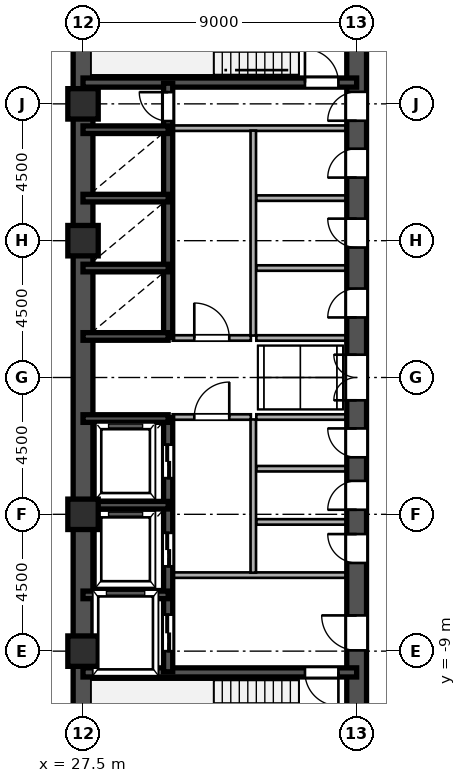
"""IFC4 building model, lengths in metres.
Left out: names, types, materials, properties, quantities, classifications, styles, units other than length and angle.
Written with IfcOpenShell. Run it as: python <this file> out.ifc"""

import sys

from ifc_helpers import new_model, si_unit, direction, frame, frame_2d, origin, origin_2d, place, context, subcontext, project, spatial, rectangle, hollow_rectangle, extrude, source, transform, mapped, element, fill, save


model = new_model("IFC4")
c1 = context("Model", 3, precision=1e-05, world=origin(), true_north=direction((0.0, 1.0)))
c2 = subcontext(c1, "Body", "Model", "MODEL_VIEW")
j1 = project(units=[si_unit("LENGTHUNIT", "METRE"), si_unit("PLANEANGLEUNIT", "RADIAN")], contexts=[c1])
p1 = place(None, origin())
s1 = spatial("IfcSite", under=j1, at=p1, CompositionType="ELEMENT")
p2 = place(p1, origin())
s2 = spatial("IfcBuilding", under=s1, at=p2, CompositionType="ELEMENT")
p3 = place(p2, frame((0.0, 0.0, 103.2)))
s3 = spatial("IfcBuildingStorey", under=s2, at=p3, CompositionType="ELEMENT", Elevation=103.2)
m1 = source(origin(), c2, "Body", "SweptSolid", [
    extrude(hollow_rectangle(XDim=1.0, YDim=1.0, WallThickness=0.042, at=origin_2d()), origin(), (0.0, 0.0, 1.0), 3.6),
])
for number, where, z_axis, x_axis in (
    (1, (27.5, -9.0, 0.0), (0.0, 0.0, 1.0), (1.0, 0.0, 0.0)),
    (2, (27.5, -4.5, 0.0), (0.0, 0.0, 1.0), (1.0, 0.0, 0.0)),
    (3, (27.5, 4.5, 0.0), (0.0, 0.0, 1.0), (1.0, 0.0, 0.0)),
    (4, (27.5, 9.0, 0.0), (0.0, 0.0, 1.0), (1.0, 0.0, 0.0)),
):
    element("IfcColumn", number, at=place(p3, frame(where, z_axis=z_axis, x_axis=x_axis)), inside=s3, PredefinedType="COLUMN", context=c2, shape_type="MappedRepresentation", body=[
        mapped(m1, transform((0.0, 0.0, 0.0), scale=1.0)),
    ])
for number, where, z_axis, x_axis in (
    (5, (27.5, -13.5, 0.0), (0.0, 0.0, 1.0), (0.0, 1.0, 0.0)),
    (6, (27.5, 1.3, 0.0), (0.0, 0.0, 1.0), (0.0, 1.0, 0.0)),
):
    element("IfcWall", number, at=place(p3, frame(where, z_axis=z_axis, x_axis=x_axis)), inside=s3, PredefinedType="SHEAR", context=c2, shape_type="SweptSolid", body=[
        extrude(rectangle(XDim=12.2, YDim=0.65, at=frame_2d((6.1, 0.0))), origin(), (0.0, 0.0, 1.0), 3.38),
    ])
p4 = place(p3, frame((27.5, -1.3, 0.0), z_axis=(0.0, 0.0, 1.0), x_axis=(0.0, 1.0, 0.0)))
e7 = element("IfcWall", 7, at=p4, inside=s3, PredefinedType="SHEAR", context=c2, shape_type="SweptSolid", body=[
    extrude(rectangle(XDim=2.6, YDim=0.65, at=frame_2d((1.3, 0.0))), origin(), (0.0, 0.0, 1.0), 3.38),
])
p5 = place(p3, frame((36.5, -13.65, 0.0), z_axis=(0.0, 0.0, 1.0), x_axis=(0.0, 1.0, 0.0)))
e8 = element("IfcWall", 8, at=p5, inside=s3, PredefinedType="SHEAR", context=c2, shape_type="SweptSolid", body=[
    extrude(rectangle(XDim=7.15, YDim=0.65, at=frame_2d((3.575, 0.0))), origin(), (0.0, 0.0, 1.0), 3.38),
])
p6 = place(p5, frame((4.675, 0.0, 0.0)))
e9 = element("IfcOpeningElement", 9, at=p6, cuts=e8, PredefinedType="OPENING", context=c2, shape_type="SweptSolid", body=[
    extrude(rectangle(XDim=1.15, YDim=2.2, at=frame_2d((0.575, 1.1))), frame((0.0, 0.335, 0.0), z_axis=(0.0, -1.0, 0.0), x_axis=(1.0, 0.0, 0.0)), (0.0, 0.0, 1.0), 0.67),
])
p7 = place(p3, frame((36.5, -1.3, 0.0), z_axis=(0.0, 0.0, 1.0), x_axis=(0.0, 1.0, 0.0)))
e10 = element("IfcWall", 10, at=p7, inside=s3, PredefinedType="SHEAR", context=c2, shape_type="SweptSolid", body=[
    extrude(rectangle(XDim=2.6, YDim=0.65, at=frame_2d((1.3, 0.0))), origin(), (0.0, 0.0, 1.0), 3.38),
])
p8 = place(p7, frame((0.55, 0.0, 0.0)))
e11 = element("IfcOpeningElement", 11, at=p8, cuts=e10, PredefinedType="OPENING", context=c2, shape_type="SweptSolid", body=[
    extrude(rectangle(XDim=1.5, YDim=2.3, at=frame_2d((0.75, 1.15))), frame((0.0, 0.335, 0.0), z_axis=(0.0, -1.0, 0.0), x_axis=(1.0, 0.0, 0.0)), (0.0, 0.0, 1.0), 0.67),
])
p9 = place(p3, frame((36.5, 8.2, 0.0), z_axis=(0.0, 0.0, 1.0), x_axis=(0.0, 1.0, 0.0)))
e12 = element("IfcWall", 12, at=p9, inside=s3, PredefinedType="SHEAR", context=c2, shape_type="SweptSolid", body=[
    extrude(rectangle(XDim=5.45, YDim=0.65, at=frame_2d((2.725, 0.0))), origin(), (0.0, 0.0, 1.0), 3.38),
])
p10 = place(p9, frame((0.245, 0.0, 0.0)))
e13 = element("IfcOpeningElement", 13, at=p10, cuts=e12, PredefinedType="OPENING", context=c2, shape_type="SweptSolid", body=[
    extrude(rectangle(XDim=0.95, YDim=2.15, at=frame_2d((0.475, 1.075))), frame((0.0, 0.335, 0.0), z_axis=(0.0, -1.0, 0.0), x_axis=(1.0, 0.0, 0.0)), (0.0, 0.0, 1.0), 0.67),
])
p11 = place(p3, frame((36.5, -6.5, 0.0), z_axis=(0.0, 0.0, 1.0), x_axis=(0.0, 1.0, 0.0)))
e14 = element("IfcWall", 14, at=p11, inside=s3, PredefinedType="SHEAR", context=c2, shape_type="SweptSolid", body=[
    extrude(rectangle(XDim=1.75, YDim=0.65, at=frame_2d((0.875, 0.0))), origin(), (0.0, 0.0, 1.0), 3.38),
])
p12 = place(p11, frame((0.4, 0.0, 0.0)))
e15 = element("IfcOpeningElement", 15, at=p12, cuts=e14, PredefinedType="OPENING", context=c2, shape_type="SweptSolid", body=[
    extrude(rectangle(XDim=0.95, YDim=2.15, at=frame_2d((0.475, 1.075))), frame((0.0, 0.335, 0.0), z_axis=(0.0, -1.0, 0.0), x_axis=(1.0, 0.0, 0.0)), (0.0, 0.0, 1.0), 0.67),
])
p13 = place(p3, frame((36.5, -4.75, 0.0), z_axis=(0.0, 0.0, 1.0), x_axis=(0.0, 1.0, 0.0)))
e16 = element("IfcWall", 16, at=p13, inside=s3, PredefinedType="SHEAR", context=c2, shape_type="SweptSolid", body=[
    extrude(rectangle(XDim=1.75, YDim=0.65, at=frame_2d((0.875, 0.0))), origin(), (0.0, 0.0, 1.0), 3.38),
])
p14 = place(p13, frame((0.4, 0.0, 0.0)))
e17 = element("IfcOpeningElement", 17, at=p14, cuts=e16, PredefinedType="OPENING", context=c2, shape_type="SweptSolid", body=[
    extrude(rectangle(XDim=0.95, YDim=2.15, at=frame_2d((0.475, 1.075))), frame((0.0, 0.335, 0.0), z_axis=(0.0, -1.0, 0.0), x_axis=(1.0, 0.0, 0.0)), (0.0, 0.0, 1.0), 0.67),
])
p15 = place(p3, frame((36.5, -3.0, 0.0), z_axis=(0.0, 0.0, 1.0), x_axis=(0.0, 1.0, 0.0)))
e18 = element("IfcWall", 18, at=p15, inside=s3, PredefinedType="SHEAR", context=c2, shape_type="SweptSolid", body=[
    extrude(rectangle(XDim=1.7, YDim=0.65, at=frame_2d((0.85, 0.0))), origin(), (0.0, 0.0, 1.0), 3.38),
])
p16 = place(p15, frame((0.375, 0.0, 0.0)))
e19 = element("IfcOpeningElement", 19, at=p16, cuts=e18, PredefinedType="OPENING", context=c2, shape_type="SweptSolid", body=[
    extrude(rectangle(XDim=0.95, YDim=2.15, at=frame_2d((0.475, 1.075))), frame((0.0, 0.335, 0.0), z_axis=(0.0, -1.0, 0.0), x_axis=(1.0, 0.0, 0.0)), (0.0, 0.0, 1.0), 0.67),
])
p17 = place(p3, frame((36.5, 1.3, 0.0), z_axis=(0.0, 0.0, 1.0), x_axis=(0.0, 1.0, 0.0)))
e20 = element("IfcWall", 20, at=p17, inside=s3, PredefinedType="SHEAR", context=c2, shape_type="SweptSolid", body=[
    extrude(rectangle(XDim=2.3, YDim=0.65, at=frame_2d((1.15, 0.0))), origin(), (0.0, 0.0, 1.0), 3.38),
])
p18 = place(p17, frame((0.675, 0.0, 0.0)))
e21 = element("IfcOpeningElement", 21, at=p18, cuts=e20, PredefinedType="OPENING", context=c2, shape_type="SweptSolid", body=[
    extrude(rectangle(XDim=0.95, YDim=2.15, at=frame_2d((0.475, 1.075))), frame((0.0, 0.335, 0.0), z_axis=(0.0, -1.0, 0.0), x_axis=(1.0, 0.0, 0.0)), (0.0, 0.0, 1.0), 0.67),
])
p19 = place(p3, frame((36.5, 3.6, 0.0), z_axis=(0.0, 0.0, 1.0), x_axis=(0.0, 1.0, 0.0)))
e22 = element("IfcWall", 22, at=p19, inside=s3, PredefinedType="SHEAR", context=c2, shape_type="SweptSolid", body=[
    extrude(rectangle(XDim=2.3, YDim=0.65, at=frame_2d((1.15, 0.0))), origin(), (0.0, 0.0, 1.0), 3.38),
])
p20 = place(p19, frame((0.675, 0.0, 0.0)))
e23 = element("IfcOpeningElement", 23, at=p20, cuts=e22, PredefinedType="OPENING", context=c2, shape_type="SweptSolid", body=[
    extrude(rectangle(XDim=0.95, YDim=2.15, at=frame_2d((0.475, 1.075))), frame((0.0, 0.335, 0.0), z_axis=(0.0, -1.0, 0.0), x_axis=(1.0, 0.0, 0.0)), (0.0, 0.0, 1.0), 0.67),
])
p21 = place(p3, frame((36.5, 5.9, 0.0), z_axis=(0.0, 0.0, 1.0), x_axis=(0.0, 1.0, 0.0)))
e24 = element("IfcWall", 24, at=p21, inside=s3, PredefinedType="SHEAR", context=c2, shape_type="SweptSolid", body=[
    extrude(rectangle(XDim=2.3, YDim=0.65, at=frame_2d((1.15, 0.0))), origin(), (0.0, 0.0, 1.0), 3.38),
])
p22 = place(p21, frame((0.675, 0.0, 0.0)))
e25 = element("IfcOpeningElement", 25, at=p22, cuts=e24, PredefinedType="OPENING", context=c2, shape_type="SweptSolid", body=[
    extrude(rectangle(XDim=0.95, YDim=2.15, at=frame_2d((0.475, 1.075))), frame((0.0, 0.335, 0.0), z_axis=(0.0, -1.0, 0.0), x_axis=(1.0, 0.0, 0.0)), (0.0, 0.0, 1.0), 0.67),
])
p23 = place(p3, frame((27.5, -9.7, 0.0), z_axis=(0.0, 0.0, 1.0), x_axis=(1.0, 0.0, 0.0)))
e26 = element("IfcWall", 26, at=p23, inside=s3, PredefinedType="SHEAR", context=c2, shape_type="SweptSolid", body=[
    extrude(rectangle(XDim=9.0, YDim=0.3, at=frame_2d((4.5, 0.0))), origin(), (0.0, 0.0, 1.0), 3.38),
])
p24 = place(p23, frame((7.3, 0.0, 0.0)))
e27 = element("IfcOpeningElement", 27, at=p24, cuts=e26, PredefinedType="OPENING", context=c2, shape_type="SweptSolid", body=[
    extrude(rectangle(XDim=1.1, YDim=2.2, at=frame_2d((0.55, 1.1))), frame((0.0, 0.16, 0.0), z_axis=(0.0, -1.0, 0.0), x_axis=(1.0, 0.0, 0.0)), (0.0, 0.0, 1.0), 0.32),
])
p25 = place(p3, frame((27.5, 9.7, 0.0), z_axis=(0.0, 0.0, 1.0), x_axis=(1.0, 0.0, 0.0)))
e28 = element("IfcWall", 28, at=p25, inside=s3, PredefinedType="SHEAR", context=c2, shape_type="SweptSolid", body=[
    extrude(rectangle(XDim=9.0, YDim=0.3, at=frame_2d((4.5, 0.0))), origin(), (0.0, 0.0, 1.0), 3.38),
])
p26 = place(p25, frame((7.3, 0.0, 0.0)))
e29 = element("IfcOpeningElement", 29, at=p26, cuts=e28, PredefinedType="OPENING", context=c2, shape_type="SweptSolid", body=[
    extrude(rectangle(XDim=1.1, YDim=2.2, at=frame_2d((0.55, 1.1))), frame((0.0, 0.16, 0.0), z_axis=(0.0, -1.0, 0.0), x_axis=(1.0, 0.0, 0.0)), (0.0, 0.0, 1.0), 0.32),
])
for number, where, z_axis, x_axis in (
    (30, (27.5, -7.15, 0.0), (0.0, 0.0, 1.0), (1.0, 0.0, 0.0)),
    (31, (27.5, -4.2, 0.0), (0.0, 0.0, 1.0), (1.0, 0.0, 0.0)),
    (32, (27.5, -1.35, 0.0), (0.0, 0.0, 1.0), (1.0, 0.0, 0.0)),
    (33, (27.5, 1.35, 0.0), (0.0, 0.0, 1.0), (1.0, 0.0, 0.0)),
    (34, (27.5, 3.6, 0.0), (0.0, 0.0, 1.0), (1.0, 0.0, 0.0)),
    (35, (27.5, 5.9, 0.0), (0.0, 0.0, 1.0), (1.0, 0.0, 0.0)),
    (36, (27.5, 8.15, 0.0), (0.0, 0.0, 1.0), (1.0, 0.0, 0.0)),
):
    element("IfcWall", number, at=place(p3, frame(where, z_axis=z_axis, x_axis=x_axis)), inside=s3, PredefinedType="SHEAR", context=c2, shape_type="SweptSolid", body=[
        extrude(rectangle(XDim=2.8, YDim=0.25, at=frame_2d((1.4, 0.0))), origin(), (0.0, 0.0, 1.0), 3.38),
    ])
p27 = place(p3, frame((30.3, -9.68, 0.0), z_axis=(0.0, 0.0, 1.0), x_axis=(0.0, 1.0, 0.0)))
e37 = element("IfcWall", 37, at=p27, inside=s3, PredefinedType="SHEAR", context=c2, shape_type="SweptSolid", body=[
    extrude(rectangle(XDim=2.56, YDim=0.3, at=frame_2d((1.28, 0.0))), origin(), (0.0, 0.0, 1.0), 3.38),
])
p28 = place(p27, frame((0.68, 0.0, 0.0)))
e38 = element("IfcOpeningElement", 38, at=p28, cuts=e37, PredefinedType="OPENING", context=c2, shape_type="SweptSolid", body=[
    extrude(rectangle(XDim=1.2, YDim=2.25, at=frame_2d((0.6, 1.125))), frame((0.0, 0.16, 0.0), z_axis=(0.0, -1.0, 0.0), x_axis=(1.0, 0.0, 0.0)), (0.0, 0.0, 1.0), 0.32),
])
p29 = place(p3, frame((30.3, -7.12, 0.0), z_axis=(0.0, 0.0, 1.0), x_axis=(0.0, 1.0, 0.0)))
e39 = element("IfcWall", 39, at=p29, inside=s3, PredefinedType="SHEAR", context=c2, shape_type="SweptSolid", body=[
    extrude(rectangle(XDim=2.92, YDim=0.3, at=frame_2d((1.46, 0.0))), origin(), (0.0, 0.0, 1.0), 3.38),
])
p30 = place(p29, frame((0.91, 0.0, 0.0)))
e40 = element("IfcOpeningElement", 40, at=p30, cuts=e39, PredefinedType="OPENING", context=c2, shape_type="SweptSolid", body=[
    extrude(rectangle(XDim=1.1, YDim=2.2, at=frame_2d((0.55, 1.1))), frame((0.0, 0.16, 0.0), z_axis=(0.0, -1.0, 0.0), x_axis=(1.0, 0.0, 0.0)), (0.0, 0.0, 1.0), 0.32),
])
p31 = place(p3, frame((30.3, -4.2, 0.0), z_axis=(0.0, 0.0, 1.0), x_axis=(0.0, 1.0, 0.0)))
e41 = element("IfcWall", 41, at=p31, inside=s3, PredefinedType="SHEAR", context=c2, shape_type="SweptSolid", body=[
    extrude(rectangle(XDim=2.88, YDim=0.3, at=frame_2d((1.44, 0.0))), origin(), (0.0, 0.0, 1.0), 3.38),
])
p32 = place(p31, frame((0.89, 0.0, 0.0)))
e42 = element("IfcOpeningElement", 42, at=p32, cuts=e41, PredefinedType="OPENING", context=c2, shape_type="SweptSolid", body=[
    extrude(rectangle(XDim=1.1, YDim=2.2, at=frame_2d((0.55, 1.1))), frame((0.0, 0.16, 0.0), z_axis=(0.0, -1.0, 0.0), x_axis=(1.0, 0.0, 0.0)), (0.0, 0.0, 1.0), 0.32),
])
p33 = place(p3, frame((30.3, 1.32, 0.0), z_axis=(0.0, 0.0, 1.0), x_axis=(0.0, 1.0, 0.0)))
e43 = element("IfcWall", 43, at=p33, inside=s3, PredefinedType="SHEAR", context=c2, shape_type="SweptSolid", body=[
    extrude(rectangle(XDim=2.28, YDim=0.3, at=frame_2d((1.14, 0.0))), origin(), (0.0, 0.0, 1.0), 3.38),
])
p34 = place(p3, frame((30.3, 3.6, 0.0), z_axis=(0.0, 0.0, 1.0), x_axis=(0.0, 1.0, 0.0)))
e44 = element("IfcWall", 44, at=p34, inside=s3, PredefinedType="SHEAR", context=c2, shape_type="SweptSolid", body=[
    extrude(rectangle(XDim=2.3, YDim=0.3, at=frame_2d((1.15, 0.0))), origin(), (0.0, 0.0, 1.0), 3.38),
])
p35 = place(p3, frame((30.3, 5.9, 0.0), z_axis=(0.0, 0.0, 1.0), x_axis=(0.0, 1.0, 0.0)))
e45 = element("IfcWall", 45, at=p35, inside=s3, PredefinedType="SHEAR", context=c2, shape_type="SweptSolid", body=[
    extrude(rectangle(XDim=2.25, YDim=0.3, at=frame_2d((1.125, 0.0))), origin(), (0.0, 0.0, 1.0), 3.38),
])
p36 = place(p3, frame((30.3, 8.15, 0.0), z_axis=(0.0, 0.0, 1.0), x_axis=(0.0, 1.0, 0.0)))
e46 = element("IfcWall", 46, at=p36, inside=s3, PredefinedType="SHEAR", context=c2, shape_type="SweptSolid", body=[
    extrude(rectangle(XDim=1.53, YDim=0.3, at=frame_2d((0.765, 0.0))), origin(), (0.0, 0.0, 1.0), 3.38),
])
p37 = place(p36, frame((0.285, 0.0, 0.0)))
e47 = element("IfcOpeningElement", 47, at=p37, cuts=e46, PredefinedType="OPENING", context=c2, shape_type="SweptSolid", body=[
    extrude(rectangle(XDim=0.95, YDim=2.15, at=frame_2d((0.475, 1.075))), frame((0.0, 0.16, 0.0), z_axis=(0.0, -1.0, 0.0), x_axis=(1.0, 0.0, 0.0)), (0.0, 0.0, 1.0), 0.32),
])
for number, where, z_axis, x_axis in (
    (48, (30.45, -6.5, 0.0), (0.0, 0.0, 1.0), (1.0, 0.0, 0.0)),
    (49, (30.45, 8.2, 0.0), (0.0, 0.0, 1.0), (1.0, 0.0, 0.0)),
):
    element("IfcWall", number, at=place(p3, frame(where, z_axis=z_axis, x_axis=x_axis)), inside=s3, PredefinedType="PARTITIONING", context=c2, shape_type="SweptSolid", body=[
        extrude(rectangle(XDim=5.7, YDim=0.18, at=frame_2d((2.85, 0.0))), origin(), (0.0, 0.0, 1.0), 3.38),
    ])
p38 = place(p3, frame((33.1, -6.42, 0.0), z_axis=(0.0, 0.0, 1.0), x_axis=(0.0, 1.0, 0.0)))
e50 = element("IfcWall", 50, at=p38, inside=s3, PredefinedType="PARTITIONING", context=c2, shape_type="SweptSolid", body=[
    extrude(rectangle(XDim=5.04, YDim=0.18, at=frame_2d((2.52, 0.0))), origin(), (0.0, 0.0, 1.0), 3.38),
])
p39 = place(p3, frame((33.1, 1.38, 0.0), z_axis=(0.0, 0.0, 1.0), x_axis=(0.0, 1.0, 0.0)))
e51 = element("IfcWall", 51, at=p39, inside=s3, PredefinedType="PARTITIONING", context=c2, shape_type="SweptSolid", body=[
    extrude(rectangle(XDim=6.74, YDim=0.18, at=frame_2d((3.37, 0.0))), origin(), (0.0, 0.0, 1.0), 3.38),
])
p40 = place(p3, frame((30.45, -1.3, 0.0), z_axis=(0.0, 0.0, 1.0), x_axis=(1.0, 0.0, 0.0)))
e52 = element("IfcWall", 52, at=p40, inside=s3, PredefinedType="PARTITIONING", context=c2, shape_type="SweptSolid", body=[
    extrude(rectangle(XDim=2.57, YDim=0.18, at=frame_2d((1.285, 0.0))), origin(), (0.0, 0.0, 1.0), 3.38),
])
p41 = place(p40, frame((0.71, 0.0, 0.0)))
e53 = element("IfcOpeningElement", 53, at=p41, cuts=e52, PredefinedType="OPENING", context=c2, shape_type="SweptSolid", body=[
    extrude(rectangle(XDim=1.15, YDim=2.2, at=frame_2d((0.575, 1.1))), frame((0.0, 0.1, 0.0), z_axis=(0.0, -1.0, 0.0), x_axis=(1.0, 0.0, 0.0)), (0.0, 0.0, 1.0), 0.2),
])
p42 = place(p3, frame((30.45, 1.3, 0.0), z_axis=(0.0, 0.0, 1.0), x_axis=(1.0, 0.0, 0.0)))
e54 = element("IfcWall", 54, at=p42, inside=s3, PredefinedType="PARTITIONING", context=c2, shape_type="SweptSolid", body=[
    extrude(rectangle(XDim=2.57, YDim=0.18, at=frame_2d((1.285, 0.0))), origin(), (0.0, 0.0, 1.0), 3.38),
])
p43 = place(p42, frame((0.71, 0.0, 0.0)))
e55 = element("IfcOpeningElement", 55, at=p43, cuts=e54, PredefinedType="OPENING", context=c2, shape_type="SweptSolid", body=[
    extrude(rectangle(XDim=1.15, YDim=2.2, at=frame_2d((0.575, 1.1))), frame((0.0, 0.1, 0.0), z_axis=(0.0, -1.0, 0.0), x_axis=(1.0, 0.0, 0.0)), (0.0, 0.0, 1.0), 0.2),
])
for number, where, z_axis, x_axis in (
    (56, (33.2, -1.3, 0.0), (0.0, 0.0, 1.0), (1.0, 0.0, 0.0)),
    (57, (33.2, 1.3, 0.0), (0.0, 0.0, 1.0), (1.0, 0.0, 0.0)),
    (58, (33.2, -4.75, 0.0), (0.0, 0.0, 1.0), (1.0, 0.0, 0.0)),
    (59, (33.2, -3.0, 0.0), (0.0, 0.0, 1.0), (1.0, 0.0, 0.0)),
    (60, (33.2, 3.6, 0.0), (0.0, 0.0, 1.0), (1.0, 0.0, 0.0)),
    (61, (33.2, 5.9, 0.0), (0.0, 0.0, 1.0), (1.0, 0.0, 0.0)),
):
    element("IfcWall", number, at=place(p3, frame(where, z_axis=z_axis, x_axis=x_axis)), inside=s3, PredefinedType="PARTITIONING", context=c2, shape_type="SweptSolid", body=[
        extrude(rectangle(XDim=2.95, YDim=0.18, at=frame_2d((1.475, 0.0))), origin(), (0.0, 0.0, 1.0), 3.38),
    ])
m2 = source(origin(), c2, "Body", "SweptSolid", [
    extrude(rectangle(XDim=1.15, YDim=2.2, at=frame_2d((0.575, 1.1))), frame((0.0, 0.025, 0.0), z_axis=(0.0, -1.0, 0.0), x_axis=(1.0, 0.0, 0.0)), (0.0, 0.0, 1.0), 0.05),
])
p44 = place(p6, origin())
e62 = element("IfcDoor", 62, at=p44, inside=s3, OperationType="SINGLE_SWING_RIGHT", PredefinedType="DOOR", context=c2, shape_type="MappedRepresentation", body=[
    mapped(m2, transform((0.0, 0.0, 0.0), scale=1.0)),
])
fill(e9, e62)
m3 = source(origin(), c2, "Body", "SweptSolid", [
    extrude(rectangle(XDim=1.5, YDim=2.3, at=frame_2d((0.75, 1.15))), frame((0.0, 0.025, 0.0), z_axis=(0.0, -1.0, 0.0), x_axis=(1.0, 0.0, 0.0)), (0.0, 0.0, 1.0), 0.05),
])
p45 = place(p8, origin())
e63 = element("IfcDoor", 63, at=p45, inside=s3, OperationType="DOUBLE_SWING_LEFT", PredefinedType="DOOR", context=c2, shape_type="MappedRepresentation", body=[
    mapped(m3, transform((0.0, 0.0, 0.0), scale=1.0)),
])
fill(e11, e63)
m4 = source(origin(), c2, "Body", "SweptSolid", [
    extrude(rectangle(XDim=0.95, YDim=2.15, at=frame_2d((0.475, 1.075))), frame((0.0, 0.025, 0.0), z_axis=(0.0, -1.0, 0.0), x_axis=(1.0, 0.0, 0.0)), (0.0, 0.0, 1.0), 0.05),
])
p46 = place(p10, origin())
e64 = element("IfcDoor", 64, at=p46, inside=s3, OperationType="SINGLE_SWING_LEFT", PredefinedType="DOOR", context=c2, shape_type="MappedRepresentation", body=[
    mapped(m4, transform((0.0, 0.0, 0.0), scale=1.0)),
])
fill(e13, e64)
p47 = place(p12, origin())
e65 = element("IfcDoor", 65, at=p47, inside=s3, OperationType="SINGLE_SWING_RIGHT", PredefinedType="DOOR", context=c2, shape_type="MappedRepresentation", body=[
    mapped(m4, transform((0.0, 0.0, 0.0), scale=1.0)),
])
fill(e15, e65)
p48 = place(p14, origin())
e66 = element("IfcDoor", 66, at=p48, inside=s3, OperationType="SINGLE_SWING_LEFT", PredefinedType="DOOR", context=c2, shape_type="MappedRepresentation", body=[
    mapped(m4, transform((0.0, 0.0, 0.0), scale=1.0)),
])
fill(e17, e66)
p49 = place(p16, origin())
e67 = element("IfcDoor", 67, at=p49, inside=s3, OperationType="SINGLE_SWING_RIGHT", PredefinedType="DOOR", context=c2, shape_type="MappedRepresentation", body=[
    mapped(m4, transform((0.0, 0.0, 0.0), scale=1.0)),
])
fill(e19, e67)
p50 = place(p18, origin())
e68 = element("IfcDoor", 68, at=p50, inside=s3, OperationType="SINGLE_SWING_LEFT", PredefinedType="DOOR", context=c2, shape_type="MappedRepresentation", body=[
    mapped(m4, transform((0.0, 0.0, 0.0), scale=1.0)),
])
fill(e21, e68)
p51 = place(p20, origin())
e69 = element("IfcDoor", 69, at=p51, inside=s3, OperationType="SINGLE_SWING_RIGHT", PredefinedType="DOOR", context=c2, shape_type="MappedRepresentation", body=[
    mapped(m4, transform((0.0, 0.0, 0.0), scale=1.0)),
])
fill(e23, e69)
p52 = place(p22, origin())
e70 = element("IfcDoor", 70, at=p52, inside=s3, OperationType="SINGLE_SWING_LEFT", PredefinedType="DOOR", context=c2, shape_type="MappedRepresentation", body=[
    mapped(m4, transform((0.0, 0.0, 0.0), scale=1.0)),
])
fill(e25, e70)
m5 = source(origin(), c2, "Body", "SweptSolid", [
    extrude(rectangle(XDim=1.1, YDim=2.2, at=frame_2d((0.55, 1.1))), frame((0.0, 0.025, 0.0), z_axis=(0.0, -1.0, 0.0), x_axis=(1.0, 0.0, 0.0)), (0.0, 0.0, 1.0), 0.05),
])
p53 = place(p24, frame((1.1, 0.0, 0.0), z_axis=(0.0, 0.0, 1.0), x_axis=(-1.0, 0.0, 0.0)))
e71 = element("IfcDoor", 71, at=p53, inside=s3, OperationType="SINGLE_SWING_RIGHT", PredefinedType="DOOR", context=c2, shape_type="MappedRepresentation", body=[
    mapped(m5, transform((0.0, 0.0, 0.0), scale=1.0)),
])
fill(e27, e71)
p54 = place(p26, origin())
e72 = element("IfcDoor", 72, at=p54, inside=s3, OperationType="SINGLE_SWING_LEFT", PredefinedType="DOOR", context=c2, shape_type="MappedRepresentation", body=[
    mapped(m5, transform((0.0, 0.0, 0.0), scale=1.0)),
])
fill(e29, e72)
m6 = source(origin(), c2, "Body", "SweptSolid", [
    extrude(rectangle(XDim=1.2, YDim=2.25, at=frame_2d((0.6, 1.125))), frame((0.0, 0.025, 0.0), z_axis=(0.0, -1.0, 0.0), x_axis=(1.0, 0.0, 0.0)), (0.0, 0.0, 1.0), 0.05),
])
p55 = place(p28, origin())
e73 = element("IfcDoor", 73, at=p55, inside=s3, OperationType="DOUBLE_DOOR_SLIDING", PredefinedType="DOOR", context=c2, shape_type="MappedRepresentation", body=[
    mapped(m6, transform((0.0, 0.0, 0.0), scale=1.0)),
])
fill(e38, e73)
m7 = source(origin(), c2, "Body", "SweptSolid", [
    extrude(rectangle(XDim=1.1, YDim=2.2, at=frame_2d((0.55, 1.1))), frame((0.0, 0.025, 0.0), z_axis=(0.0, -1.0, 0.0), x_axis=(1.0, 0.0, 0.0)), (0.0, 0.0, 1.0), 0.05),
])
p56 = place(p30, origin())
e74 = element("IfcDoor", 74, at=p56, inside=s3, OperationType="DOUBLE_DOOR_SLIDING", PredefinedType="DOOR", context=c2, shape_type="MappedRepresentation", body=[
    mapped(m7, transform((0.0, 0.0, 0.0), scale=1.0)),
])
fill(e40, e74)
p57 = place(p32, origin())
e75 = element("IfcDoor", 75, at=p57, inside=s3, OperationType="DOUBLE_DOOR_SLIDING", PredefinedType="DOOR", context=c2, shape_type="MappedRepresentation", body=[
    mapped(m7, transform((0.0, 0.0, 0.0), scale=1.0)),
])
fill(e42, e75)
p58 = place(p37, origin())
e76 = element("IfcDoor", 76, at=p58, inside=s3, OperationType="SINGLE_SWING_RIGHT", PredefinedType="DOOR", context=c2, shape_type="MappedRepresentation", body=[
    mapped(m4, transform((0.0, 0.0, 0.0), scale=1.0)),
])
fill(e47, e76)
p59 = place(p41, origin())
e77 = element("IfcDoor", 77, at=p59, inside=s3, OperationType="SINGLE_SWING_RIGHT", PredefinedType="DOOR", context=c2, shape_type="MappedRepresentation", body=[
    mapped(m2, transform((0.0, 0.0, 0.0), scale=1.0)),
])
fill(e53, e77)
p60 = place(p43, origin())
e78 = element("IfcDoor", 78, at=p60, inside=s3, OperationType="SINGLE_SWING_LEFT", PredefinedType="DOOR", context=c2, shape_type="MappedRepresentation", body=[
    mapped(m2, transform((0.0, 0.0, 0.0), scale=1.0)),
])
fill(e55, e78)
save(model, sys.argv[1])
